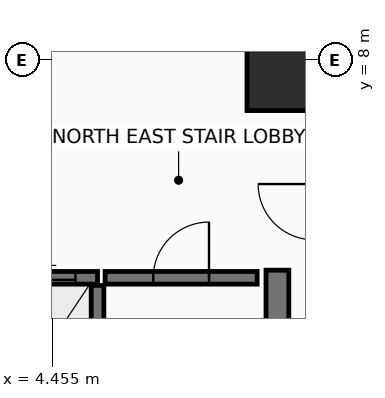
"""IFC4 building model, lengths in metres.
Left out: names, types, materials, properties, quantities, classifications, styles, units other than length and angle.
Written with IfcOpenShell. Run it as: python <this file> out.ifc"""

import sys

from ifc_helpers import new_model, si_unit, direction, frame, frame_2d, origin, origin_2d, place, context, subcontext, project, spatial, rectangle, extrude, element, fill, save


model = new_model("IFC4")
c1 = context("Model", 3, precision=1e-05, world=origin(), true_north=direction((0.0, 1.0)))
c2 = subcontext(c1, "Body", "Model", "MODEL_VIEW")
j1 = project(units=[si_unit("LENGTHUNIT", "METRE"), si_unit("PLANEANGLEUNIT", "RADIAN")], contexts=[c1])
p1 = place(None, origin())
s1 = spatial("IfcSite", under=j1, at=p1, CompositionType="ELEMENT")
p2 = place(p1, origin())
s2 = spatial("IfcBuilding", under=s1, at=p2, CompositionType="ELEMENT")
p3 = place(p2, frame((0.0, 0.0, 156.8)))
s3 = spatial("IfcBuildingStorey", under=s2, at=p3, CompositionType="ELEMENT", Elevation=156.8)
p4 = place(p3, frame((8.9, 7.6, 0.0), z_axis=(0.0, 0.0, 1.0), x_axis=(1.0, 0.0, 0.0)))
e1 = element("IfcColumn", 1, at=p4, inside=s3, PredefinedType="COLUMN", context=c2, shape_type="SweptSolid", body=[
    extrude(rectangle(XDim=1.2, YDim=1.2, at=origin_2d()), origin(), (0.0, 0.0, 1.0), 3.6),
])
p5 = place(p3, frame((8.9, -6.85, 0.0), z_axis=(0.0, 0.0, 1.0), x_axis=(0.0, 1.0, 0.0)))
e2 = element("IfcWall", 2, at=p5, inside=s3, PredefinedType="SHEAR", context=c2, shape_type="SweptSolid", body=[
    extrude(rectangle(XDim=10.7, YDim=0.45, at=frame_2d((5.35, 0.0))), origin(), (0.0, 0.0, 1.0), 3.41),
])
p6 = place(p3, frame((5.35, -3.75, 0.0), z_axis=(0.0, 0.0, 1.0), x_axis=(0.0, 1.0, 0.0)))
e3 = element("IfcWall", 3, at=p6, inside=s3, PredefinedType="SHEAR", context=c2, shape_type="SweptSolid", body=[
    extrude(rectangle(XDim=7.3, YDim=0.25, at=frame_2d((3.65, 0.0))), origin(), (0.0, 0.0, 1.0), 3.41),
])
p7 = place(p3, frame((5.5, 3.7, 0.0), z_axis=(0.0, 0.0, 1.0), x_axis=(1.0, 0.0, 0.0)))
e4 = element("IfcWall", 4, at=p7, inside=s3, PredefinedType="SHEAR", context=c2, shape_type="SweptSolid", body=[
    extrude(rectangle(XDim=3.0, YDim=0.25, at=frame_2d((1.5, 0.0))), origin(), (0.0, 0.0, 1.0), 3.41),
])
p8 = place(p7, frame((0.95, 0.0, 0.0)))
e5 = element("IfcOpeningElement", 5, at=p8, cuts=e4, PredefinedType="OPENING", context=c2, shape_type="SweptSolid", body=[
    extrude(rectangle(XDim=1.1, YDim=2.15, at=frame_2d((0.55, 1.075))), frame((0.0, 0.135, 0.0), z_axis=(0.0, -1.0, 0.0), x_axis=(1.0, 0.0, 0.0)), (0.0, 0.0, 1.0), 0.27),
])
p9 = place(p3, frame((3.28, 3.7, 0.0), z_axis=(0.0, 0.0, 1.0), x_axis=(1.0, 0.0, 0.0)))
e6 = element("IfcWall", 6, at=p9, inside=s3, PredefinedType="SHEAR", context=c2, shape_type="SweptSolid", body=[
    extrude(rectangle(XDim=2.07, YDim=0.25, at=frame_2d((1.035, 0.0))), origin(), (0.0, 0.0, 1.0), 3.41),
])
p10 = place(p9, frame((0.435, 0.0, 0.0)))
e7 = element("IfcOpeningElement", 7, at=p10, cuts=e6, PredefinedType="OPENING", context=c2, shape_type="SweptSolid", body=[
    extrude(rectangle(XDim=1.2, YDim=2.2, at=frame_2d((0.6, 1.1))), frame((0.0, 0.135, 0.0), z_axis=(0.0, -1.0, 0.0), x_axis=(1.0, 0.0, 0.0)), (0.0, 0.0, 1.0), 0.27),
])
p11 = place(p8, frame((1.1, 0.0, 0.0), z_axis=(0.0, 0.0, 1.0), x_axis=(-1.0, 0.0, 0.0)))
e8 = element("IfcDoor", 8, at=p11, inside=s3, OperationType="SINGLE_SWING_LEFT", PredefinedType="DOOR", context=c2, shape_type="SweptSolid", body=[
    extrude(rectangle(XDim=1.1, YDim=2.15, at=frame_2d((0.55, 1.075))), frame((0.0, 0.025, 0.0), z_axis=(0.0, -1.0, 0.0), x_axis=(1.0, 0.0, 0.0)), (0.0, 0.0, 1.0), 0.05),
])
fill(e5, e8)
p12 = place(p10, origin())
e9 = element("IfcDoor", 9, at=p12, inside=s3, OperationType="SLIDING_TO_RIGHT", PredefinedType="DOOR", context=c2, shape_type="SweptSolid", body=[
    extrude(rectangle(XDim=1.2, YDim=2.2, at=frame_2d((0.6, 1.1))), frame((0.0, 0.025, 0.0), z_axis=(0.0, -1.0, 0.0), x_axis=(1.0, 0.0, 0.0)), (0.0, 0.0, 1.0), 0.05),
])
fill(e7, e9)
save(model, sys.argv[1])
